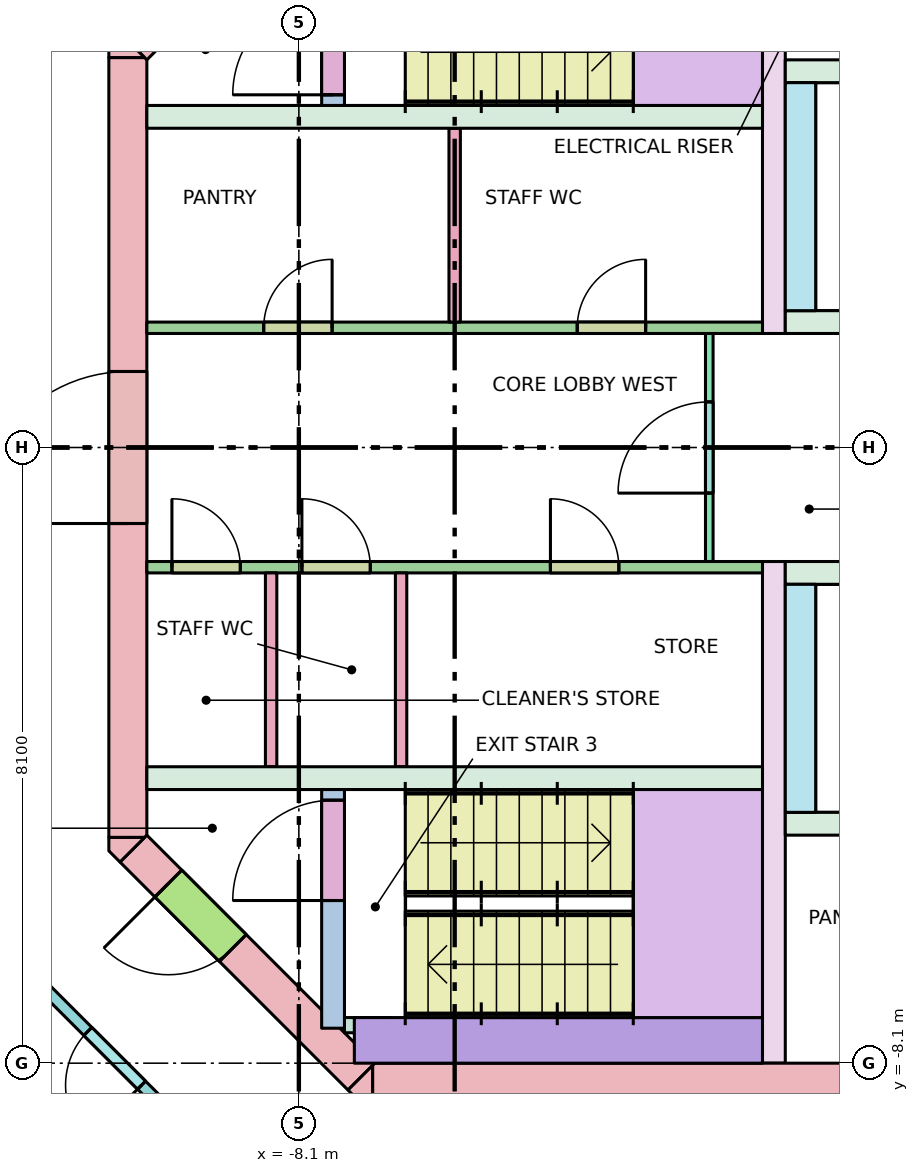
"""IFC4 building model, lengths in metres.
Left out: names, types, materials, properties, quantities, classifications, styles, units other than length and angle.
Written with IfcOpenShell. Run it as: python <this file> out.ifc"""

import sys

from ifc_helpers import new_model, si_unit, direction, frame, frame_2d, origin, place, context, subcontext, project, spatial, polyline, rectangle, outline, extrude, element, fill, save


model = new_model("IFC4")
c1 = context("Model", 3, precision=1e-05, world=origin(), true_north=direction((0.0, 1.0)))
c2 = subcontext(c1, "Body", "Model", "MODEL_VIEW")
j1 = project(units=[si_unit("LENGTHUNIT", "METRE"), si_unit("PLANEANGLEUNIT", "RADIAN")], contexts=[c1])
p1 = place(None, origin())
s1 = spatial("IfcSite", under=j1, at=p1, CompositionType="ELEMENT")
p2 = place(p1, origin())
s2 = spatial("IfcBuilding", under=s1, at=p2, CompositionType="ELEMENT")
p3 = place(p2, frame((0.0, 0.0, 283.4)))
s3 = spatial("IfcBuildingStorey", under=s2, at=p3, CompositionType="ELEMENT", Elevation=283.4)
p4 = place(p3, frame((-7.13, -8.35, -0.28), z_axis=(0.0, 0.0, 1.0), x_axis=(1.0, 0.0, 0.0)))
e1 = element("IfcWall", 1, at=p4, inside=s3, PredefinedType="SHEAR", context=c2, shape_type="SweptSolid", body=[
    extrude(rectangle(XDim=14.26, YDim=0.5, at=frame_2d((7.13, 0.0))), origin(), (0.0, 0.0, 1.0), 3.7),
])
p5 = place(p4, frame((8.08, 0.0, 0.28)))
e2 = element("IfcOpeningElement", 2, at=p5, cuts=e1, PredefinedType="OPENING", context=c2, shape_type="SweptSolid", body=[
    extrude(rectangle(XDim=0.7, YDim=2.1, at=frame_2d((0.35, 1.05))), frame((0.0, 0.26, 0.0), z_axis=(0.0, -1.0, 0.0), x_axis=(1.0, 0.0, 0.0)), (0.0, 0.0, 1.0), 0.52),
])
p6 = place(p4, frame((6.205, 0.0, 0.28)))
e3 = element("IfcOpeningElement", 3, at=p6, cuts=e1, PredefinedType="OPENING", context=c2, shape_type="SweptSolid", body=[
    extrude(rectangle(XDim=0.9, YDim=2.1, at=frame_2d((0.45, 1.05))), frame((0.0, 0.26, 0.0), z_axis=(0.0, -1.0, 0.0), x_axis=(1.0, 0.0, 0.0)), (0.0, 0.0, 1.0), 0.52),
])
p7 = place(p4, frame((10.667, 0.0, 0.28)))
e4 = element("IfcOpeningElement", 4, at=p7, cuts=e1, PredefinedType="OPENING", context=c2, shape_type="SweptSolid", body=[
    extrude(rectangle(XDim=0.9, YDim=2.1, at=frame_2d((0.45, 1.05))), frame((0.0, 0.26, 0.0), z_axis=(0.0, -1.0, 0.0), x_axis=(1.0, 0.0, 0.0)), (0.0, 0.0, 1.0), 0.52),
])
p8 = place(p3, frame((-10.35, -5.13, -0.28), z_axis=(0.0, 0.0, 1.0), x_axis=(0.0, 1.0, 0.0)))
e5 = element("IfcWall", 5, at=p8, inside=s3, PredefinedType="SHEAR", context=c2, shape_type="SweptSolid", body=[
    extrude(rectangle(XDim=10.26, YDim=0.5, at=frame_2d((5.13, 0.0))), origin(), (0.0, 0.0, 1.0), 3.7),
])
p9 = place(p8, frame((4.13, 0.0, 0.28)))
e6 = element("IfcOpeningElement", 6, at=p9, cuts=e5, PredefinedType="OPENING", context=c2, shape_type="SweptSolid", body=[
    extrude(rectangle(XDim=2.0, YDim=2.1, at=frame_2d((1.0, 1.05))), frame((0.0, 0.26, 0.0), z_axis=(0.0, -1.0, 0.0), x_axis=(1.0, 0.0, 0.0)), (0.0, 0.0, 1.0), 0.52),
])
p10 = place(p3, frame((-10.277, 5.277, -0.28), z_axis=(0.0, 0.0, 1.0), x_axis=(0.707106781187, 0.707106781187, 0.0)))
e7 = element("IfcWall", 7, at=p10, inside=s3, PredefinedType="SHEAR", context=c2, shape_type="SweptSolid", body=[
    extrude(rectangle(XDim=4.243, YDim=0.5, at=frame_2d((2.121, 0.0))), origin(), (0.0, 0.0, 1.0), 3.7),
])
p11 = place(p10, frame((0.65, 0.0, 0.28)))
e8 = element("IfcOpeningElement", 8, at=p11, cuts=e7, PredefinedType="OPENING", context=c2, shape_type="SweptSolid", body=[
    extrude(rectangle(XDim=1.2, YDim=2.1, at=frame_2d((0.6, 1.05))), frame((0.0, 0.26, 0.0), z_axis=(0.0, -1.0, 0.0), x_axis=(1.0, 0.0, 0.0)), (0.0, 0.0, 1.0), 0.52),
])
p12 = place(p3, frame((-7.277, -8.277, -0.28), z_axis=(0.0, 0.0, 1.0), x_axis=(-0.707106781187, 0.707106781187, 0.0)))
e9 = element("IfcWall", 9, at=p12, inside=s3, PredefinedType="SHEAR", context=c2, shape_type="SweptSolid", body=[
    extrude(rectangle(XDim=4.243, YDim=0.5, at=frame_2d((2.121, 0.0))), origin(), (0.0, 0.0, 1.0), 3.7),
])
p13 = place(p12, frame((2.393, 0.0, 0.28)))
e10 = element("IfcOpeningElement", 10, at=p13, cuts=e9, PredefinedType="OPENING", context=c2, shape_type="SweptSolid", body=[
    extrude(rectangle(XDim=1.2, YDim=2.1, at=frame_2d((0.6, 1.05))), frame((0.0, 0.26, 0.0), z_axis=(0.0, -1.0, 0.0), x_axis=(1.0, 0.0, 0.0)), (0.0, 0.0, 1.0), 0.52),
])
p14 = place(p3, frame((0.0, 0.0, -0.28)))
e11 = element("IfcWall", 11, at=p14, inside=s3, PredefinedType="SHEAR", context=c2, shape_type="SweptSolid", body=[
    extrude(outline(polyline([(-7.307, -8.6), (-7.454, -8.454), (-7.13, -8.13), (-7.13, -8.6), (-7.307, -8.6)])), origin(), (0.0, 0.0, 1.0), 3.7),
])
p15 = place(p3, frame((0.0, 0.0, -0.28)))
e12 = element("IfcWall", 12, at=p15, inside=s3, PredefinedType="SHEAR", context=c2, shape_type="SweptSolid", body=[
    extrude(outline(polyline([(-10.6, -5.307), (-10.6, -5.13), (-10.13, -5.13), (-10.454, -5.454), (-10.6, -5.307)])), origin(), (0.0, 0.0, 1.0), 3.7),
])
p16 = place(p3, frame((0.0, 0.0, -0.28)))
e13 = element("IfcWall", 13, at=p16, inside=s3, PredefinedType="SHEAR", context=c2, shape_type="SweptSolid", body=[
    extrude(outline(polyline([(-10.454, 5.454), (-10.13, 5.13), (-10.6, 5.13), (-10.6, 5.307), (-10.454, 5.454)])), origin(), (0.0, 0.0, 1.0), 3.7),
])
for number, where, z_axis, x_axis in (
    (14, (-10.1, 4.35, 0.0), (0.0, 0.0, 1.0), (1.0, 0.0, 0.0)),
    (15, (-10.1, -4.35, 0.0), (0.0, 0.0, 1.0), (1.0, 0.0, 0.0)),
):
    element("IfcWall", number, at=place(p3, frame(where, z_axis=z_axis, x_axis=x_axis)), inside=s3, PredefinedType="SOLIDWALL", context=c2, shape_type="SweptSolid", body=[
        extrude(rectangle(XDim=8.1, YDim=0.3, at=frame_2d((4.05, 0.0))), origin(), (0.0, 0.0, 1.0), 3.42),
    ])
for number, where, z_axis, x_axis in (
    (16, (-1.85, 1.5, 0.0), (0.0, 0.0, 1.0), (0.0, 1.0, 0.0)),
    (17, (-1.85, -8.1, 0.0), (0.0, 0.0, 1.0), (0.0, 1.0, 0.0)),
):
    element("IfcWall", number, at=place(p3, frame(where, z_axis=z_axis, x_axis=x_axis)), inside=s3, PredefinedType="SHEAR", context=c2, shape_type="SweptSolid", body=[
        extrude(rectangle(XDim=6.6, YDim=0.3, at=frame_2d((3.3, 0.0))), origin(), (0.0, 0.0, 1.0), 3.42),
    ])
p17 = place(p3, frame((-1.7, 1.65, 0.0), z_axis=(0.0, 0.0, 1.0), x_axis=(1.0, 0.0, 0.0)))
e18 = element("IfcWall", 18, at=p17, inside=s3, PredefinedType="SOLIDWALL", context=c2, shape_type="SweptSolid", body=[
    extrude(rectangle(XDim=3.4, YDim=0.3, at=frame_2d((1.7, 0.0))), origin(), (0.0, 0.0, 1.0), 3.42),
])
p18 = place(p17, frame((1.15, 0.0, 0.0)))
e19 = element("IfcOpeningElement", 19, at=p18, cuts=e18, PredefinedType="OPENING", context=c2, shape_type="SweptSolid", body=[
    extrude(rectangle(XDim=1.1, YDim=2.1, at=frame_2d((0.55, 1.05))), frame((0.0, 0.16, 0.0), z_axis=(0.0, -1.0, 0.0), x_axis=(1.0, 0.0, 0.0)), (0.0, 0.0, 1.0), 0.32),
])
p19 = place(p3, frame((-1.7, -1.65, 0.0), z_axis=(0.0, 0.0, 1.0), x_axis=(1.0, 0.0, 0.0)))
e20 = element("IfcWall", 20, at=p19, inside=s3, PredefinedType="SOLIDWALL", context=c2, shape_type="SweptSolid", body=[
    extrude(rectangle(XDim=3.4, YDim=0.3, at=frame_2d((1.7, 0.0))), origin(), (0.0, 0.0, 1.0), 3.42),
])
p20 = place(p19, frame((1.15, 0.0, 0.0)))
e21 = element("IfcOpeningElement", 21, at=p20, cuts=e20, PredefinedType="OPENING", context=c2, shape_type="SweptSolid", body=[
    extrude(rectangle(XDim=1.1, YDim=2.1, at=frame_2d((0.55, 1.05))), frame((0.0, 0.16, 0.0), z_axis=(0.0, -1.0, 0.0), x_axis=(1.0, 0.0, 0.0)), (0.0, 0.0, 1.0), 0.32),
])
for number, where, z_axis, x_axis in (
    (22, (-1.5, 1.8, 0.0), (0.0, 0.0, 1.0), (0.0, 1.0, 0.0)),
    (23, (-1.5, -4.8, 0.0), (0.0, 0.0, 1.0), (0.0, 1.0, 0.0)),
):
    element("IfcWall", number, at=place(p3, frame(where, z_axis=z_axis, x_axis=x_axis)), inside=s3, PredefinedType="SOLIDWALL", context=c2, shape_type="SweptSolid", body=[
        extrude(rectangle(XDim=3.0, YDim=0.4, at=frame_2d((1.5, 0.0))), origin(), (0.0, 0.0, 1.0), 3.42),
    ])
for number, where, z_axis, x_axis in (
    (24, (-1.7, 4.95, 0.0), (0.0, 0.0, 1.0), (1.0, 0.0, 0.0)),
    (25, (-1.7, -4.95, 0.0), (0.0, 0.0, 1.0), (1.0, 0.0, 0.0)),
):
    element("IfcWall", number, at=place(p3, frame(where, z_axis=z_axis, x_axis=x_axis)), inside=s3, PredefinedType="SOLIDWALL", context=c2, shape_type="SweptSolid", body=[
        extrude(rectangle(XDim=3.4, YDim=0.3, at=frame_2d((1.7, 0.0))), origin(), (0.0, 0.0, 1.0), 3.42),
    ])
p21 = place(p3, frame((-7.65, 4.5, 0.0), z_axis=(0.0, 0.0, 1.0), x_axis=(0.0, 1.0, 0.0)))
e26 = element("IfcWall", 26, at=p21, inside=s3, PredefinedType="SHEAR", context=c2, shape_type="SweptSolid", body=[
    extrude(rectangle(XDim=3.14, YDim=0.3, at=frame_2d((1.57, 0.0))), origin(), (0.0, 0.0, 1.0), 3.42),
])
p22 = place(p21, frame((0.14, 0.0, 0.0)))
e27 = element("IfcOpeningElement", 27, at=p22, cuts=e26, PredefinedType="OPENING", context=c2, shape_type="SweptSolid", body=[
    extrude(rectangle(XDim=1.32, YDim=2.1, at=frame_2d((0.66, 1.05))), frame((0.0, 0.16, 0.0), z_axis=(0.0, -1.0, 0.0), x_axis=(1.0, 0.0, 0.0)), (0.0, 0.0, 1.0), 0.32),
])
p23 = place(p3, frame((-7.65, -7.64, 0.0), z_axis=(0.0, 0.0, 1.0), x_axis=(0.0, 1.0, 0.0)))
e28 = element("IfcWall", 28, at=p23, inside=s3, PredefinedType="SHEAR", context=c2, shape_type="SweptSolid", body=[
    extrude(rectangle(XDim=3.14, YDim=0.3, at=frame_2d((1.57, 0.0))), origin(), (0.0, 0.0, 1.0), 3.42),
])
p24 = place(p23, frame((1.68, 0.0, 0.0)))
e29 = element("IfcOpeningElement", 29, at=p24, cuts=e28, PredefinedType="OPENING", context=c2, shape_type="SweptSolid", body=[
    extrude(rectangle(XDim=1.32, YDim=2.1, at=frame_2d((0.66, 1.05))), frame((0.0, 0.16, 0.0), z_axis=(0.0, -1.0, 0.0), x_axis=(1.0, 0.0, 0.0)), (0.0, 0.0, 1.0), 0.32),
])
p25 = place(p3, frame((-7.5, -7.6, 0.0), z_axis=(0.0, 0.0, 1.0), x_axis=(1.0, 0.0, 0.0)))
e30 = element("IfcWall", 30, at=p25, inside=s3, PredefinedType="SHEAR", context=c2, shape_type="SweptSolid", body=[
    extrude(rectangle(XDim=0.6, YDim=0.2, at=frame_2d((0.3, 0.0))), origin(), (0.0, 0.0, 1.0), 3.42),
])
p26 = place(p3, frame((-7.37, -7.8, 0.0), z_axis=(0.0, 0.0, 1.0), x_axis=(1.0, 0.0, 0.0)))
e31 = element("IfcWall", 31, at=p26, inside=s3, PredefinedType="SHEAR", context=c2, shape_type="SweptSolid", body=[
    extrude(rectangle(XDim=5.37, YDim=0.6, at=frame_2d((2.685, 0.0))), origin(), (0.0, 0.0, 1.0), 3.42),
])
p27 = place(p3, frame((-2.7, -1.5, 0.0), z_axis=(0.0, 0.0, 1.0), x_axis=(0.0, 1.0, 0.0)))
e32 = element("IfcWall", 32, at=p27, inside=s3, PredefinedType="PARTITIONING", context=c2, shape_type="SweptSolid", body=[
    extrude(rectangle(XDim=3.0, YDim=0.1, at=frame_2d((1.5, 0.0))), origin(), (0.0, 0.0, 1.0), 3.42),
])
p28 = place(p27, frame((0.9, 0.0, 0.0)))
e33 = element("IfcOpeningElement", 33, at=p28, cuts=e32, PredefinedType="OPENING", context=c2, shape_type="SweptSolid", body=[
    extrude(rectangle(XDim=1.2, YDim=2.1, at=frame_2d((0.6, 1.05))), frame((0.0, 0.06, 0.0), z_axis=(0.0, -1.0, 0.0), x_axis=(1.0, 0.0, 0.0)), (0.0, 0.0, 1.0), 0.12),
])
for number, where, z_axis, x_axis in (
    (34, (-6.05, 1.65, 0.0), (0.0, 0.0, 1.0), (0.0, 1.0, 0.0)),
    (35, (-8.465, -4.2, 0.0), (0.0, 0.0, 1.0), (0.0, 1.0, 0.0)),
    (36, (-6.755, -4.2, 0.0), (0.0, 0.0, 1.0), (0.0, 1.0, 0.0)),
):
    element("IfcWall", number, at=place(p3, frame(where, z_axis=z_axis, x_axis=x_axis)), inside=s3, PredefinedType="PARTITIONING", context=c2, shape_type="SweptSolid", body=[
        extrude(rectangle(XDim=2.55, YDim=0.15, at=frame_2d((1.275, 0.0))), origin(), (0.0, 0.0, 1.0), 3.42),
    ])
p29 = place(p3, frame((-10.1, 1.575, 0.0), z_axis=(0.0, 0.0, 1.0), x_axis=(1.0, 0.0, 0.0)))
e37 = element("IfcWall", 37, at=p29, inside=s3, PredefinedType="PARTITIONING", context=c2, shape_type="SweptSolid", body=[
    extrude(rectangle(XDim=8.1, YDim=0.15, at=frame_2d((4.05, 0.0))), origin(), (0.0, 0.0, 1.0), 3.42),
])
p30 = place(p29, frame((1.538, 0.0, 0.0)))
e38 = element("IfcOpeningElement", 38, at=p30, cuts=e37, PredefinedType="OPENING", context=c2, shape_type="SweptSolid", body=[
    extrude(rectangle(XDim=0.9, YDim=2.1, at=frame_2d((0.45, 1.05))), frame((0.0, 0.085, 0.0), z_axis=(0.0, -1.0, 0.0), x_axis=(1.0, 0.0, 0.0)), (0.0, 0.0, 1.0), 0.17),
])
p31 = place(p29, frame((5.663, 0.0, 0.0)))
e39 = element("IfcOpeningElement", 39, at=p31, cuts=e37, PredefinedType="OPENING", context=c2, shape_type="SweptSolid", body=[
    extrude(rectangle(XDim=0.9, YDim=2.1, at=frame_2d((0.45, 1.05))), frame((0.0, 0.085, 0.0), z_axis=(0.0, -1.0, 0.0), x_axis=(1.0, 0.0, 0.0)), (0.0, 0.0, 1.0), 0.17),
])
p32 = place(p3, frame((-10.1, -1.575, 0.0), z_axis=(0.0, 0.0, 1.0), x_axis=(1.0, 0.0, 0.0)))
e40 = element("IfcWall", 40, at=p32, inside=s3, PredefinedType="PARTITIONING", context=c2, shape_type="SweptSolid", body=[
    extrude(rectangle(XDim=8.1, YDim=0.15, at=frame_2d((4.05, 0.0))), origin(), (0.0, 0.0, 1.0), 3.42),
])
p33 = place(p32, frame((0.33, 0.0, 0.0)))
e41 = element("IfcOpeningElement", 41, at=p33, cuts=e40, PredefinedType="OPENING", context=c2, shape_type="SweptSolid", body=[
    extrude(rectangle(XDim=0.9, YDim=2.1, at=frame_2d((0.45, 1.05))), frame((0.0, 0.085, 0.0), z_axis=(0.0, -1.0, 0.0), x_axis=(1.0, 0.0, 0.0)), (0.0, 0.0, 1.0), 0.17),
])
p34 = place(p32, frame((2.04, 0.0, 0.0)))
e42 = element("IfcOpeningElement", 42, at=p34, cuts=e40, PredefinedType="OPENING", context=c2, shape_type="SweptSolid", body=[
    extrude(rectangle(XDim=0.9, YDim=2.1, at=frame_2d((0.45, 1.05))), frame((0.0, 0.085, 0.0), z_axis=(0.0, -1.0, 0.0), x_axis=(1.0, 0.0, 0.0)), (0.0, 0.0, 1.0), 0.17),
])
p35 = place(p32, frame((5.31, 0.0, 0.0)))
e43 = element("IfcOpeningElement", 43, at=p35, cuts=e40, PredefinedType="OPENING", context=c2, shape_type="SweptSolid", body=[
    extrude(rectangle(XDim=0.9, YDim=2.1, at=frame_2d((0.45, 1.05))), frame((0.0, 0.085, 0.0), z_axis=(0.0, -1.0, 0.0), x_axis=(1.0, 0.0, 0.0)), (0.0, 0.0, 1.0), 0.17),
])
p36 = place(p3, frame((-8.121, -10.438, 0.0), z_axis=(0.0, 0.0, 1.0), x_axis=(-0.707106781187, 0.707106781187, 0.0)))
e44 = element("IfcWall", 44, at=p36, inside=s3, PredefinedType="PARTITIONING", context=c2, shape_type="SweptSolid", body=[
    extrude(rectangle(XDim=6.105, YDim=0.15, at=frame_2d((3.053, 0.0))), origin(), (0.0, 0.0, 1.0), 2.57),
])
p37 = place(p36, frame((2.897, 0.0, 0.0)))
e45 = element("IfcOpeningElement", 45, at=p37, cuts=e44, PredefinedType="OPENING", context=c2, shape_type="SweptSolid", body=[
    extrude(rectangle(XDim=1.0, YDim=2.1, at=frame_2d((0.5, 1.05))), frame((0.0, 0.085, 0.0), z_axis=(0.0, -1.0, 0.0), x_axis=(1.0, 0.0, 0.0)), (0.0, 0.0, 1.0), 0.17),
])
p38 = place(p36, frame((0.394, 0.0, 0.0)))
e46 = element("IfcOpeningElement", 46, at=p38, cuts=e44, PredefinedType="OPENING", context=c2, shape_type="SweptSolid", body=[
    extrude(rectangle(XDim=0.9, YDim=2.1, at=frame_2d((0.45, 1.05))), frame((0.0, 0.085, 0.0), z_axis=(0.0, -1.0, 0.0), x_axis=(1.0, 0.0, 0.0)), (0.0, 0.0, 1.0), 0.17),
])
p39 = place(p22, origin())
e47 = element("IfcDoor", 47, at=p39, inside=s3, OperationType="DOUBLE_DOOR_SINGLE_SWING", PredefinedType="DOOR", context=c2, shape_type="SweptSolid", body=[
    extrude(rectangle(XDim=1.32, YDim=2.1, at=frame_2d((0.66, 1.05))), frame((0.0, 0.025, 0.0), z_axis=(0.0, -1.0, 0.0), x_axis=(1.0, 0.0, 0.0)), (0.0, 0.0, 1.0), 0.05),
])
fill(e27, e47)
p40 = place(p24, origin())
e48 = element("IfcDoor", 48, at=p40, inside=s3, OperationType="DOUBLE_DOOR_SINGLE_SWING", PredefinedType="DOOR", context=c2, shape_type="SweptSolid", body=[
    extrude(rectangle(XDim=1.32, YDim=2.1, at=frame_2d((0.66, 1.05))), frame((0.0, 0.025, 0.0), z_axis=(0.0, -1.0, 0.0), x_axis=(1.0, 0.0, 0.0)), (0.0, 0.0, 1.0), 0.05),
])
fill(e29, e48)
p41 = place(p13, origin())
e49 = element("IfcDoor", 49, at=p41, inside=s3, OperationType="SINGLE_SWING_RIGHT", PredefinedType="DOOR", context=c2, shape_type="SweptSolid", body=[
    extrude(rectangle(XDim=1.2, YDim=2.1, at=frame_2d((0.6, 1.05))), frame((0.0, 0.025, 0.0), z_axis=(0.0, -1.0, 0.0), x_axis=(1.0, 0.0, 0.0)), (0.0, 0.0, 1.0), 0.05),
])
fill(e10, e49)
p42 = place(p9, origin())
e50 = element("IfcDoor", 50, at=p42, inside=s3, OperationType="DOUBLE_DOOR_SINGLE_SWING", PredefinedType="DOOR", context=c2, shape_type="SweptSolid", body=[
    extrude(rectangle(XDim=2.0, YDim=2.1, at=frame_2d((1.0, 1.05))), frame((0.0, 0.025, 0.0), z_axis=(0.0, -1.0, 0.0), x_axis=(1.0, 0.0, 0.0)), (0.0, 0.0, 1.0), 0.05),
])
fill(e6, e50)
p43 = place(p28, origin())
e51 = element("IfcDoor", 51, at=p43, inside=s3, OperationType="SINGLE_SWING_LEFT", PredefinedType="DOOR", context=c2, shape_type="SweptSolid", body=[
    extrude(rectangle(XDim=1.2, YDim=2.1, at=frame_2d((0.6, 1.05))), frame((0.0, 0.025, 0.0), z_axis=(0.0, -1.0, 0.0), x_axis=(1.0, 0.0, 0.0)), (0.0, 0.0, 1.0), 0.05),
])
fill(e33, e51)
p44 = place(p30, origin())
e52 = element("IfcDoor", 52, at=p44, inside=s3, OperationType="SINGLE_SWING_RIGHT", PredefinedType="DOOR", context=c2, shape_type="SweptSolid", body=[
    extrude(rectangle(XDim=0.9, YDim=2.1, at=frame_2d((0.45, 1.05))), frame((0.0, 0.025, 0.0), z_axis=(0.0, -1.0, 0.0), x_axis=(1.0, 0.0, 0.0)), (0.0, 0.0, 1.0), 0.05),
])
fill(e38, e52)
p45 = place(p31, origin())
e53 = element("IfcDoor", 53, at=p45, inside=s3, OperationType="SINGLE_SWING_RIGHT", PredefinedType="DOOR", context=c2, shape_type="SweptSolid", body=[
    extrude(rectangle(XDim=0.9, YDim=2.1, at=frame_2d((0.45, 1.05))), frame((0.0, 0.025, 0.0), z_axis=(0.0, -1.0, 0.0), x_axis=(1.0, 0.0, 0.0)), (0.0, 0.0, 1.0), 0.05),
])
fill(e39, e53)
p46 = place(p33, origin())
e54 = element("IfcDoor", 54, at=p46, inside=s3, OperationType="SINGLE_SWING_LEFT", PredefinedType="DOOR", context=c2, shape_type="SweptSolid", body=[
    extrude(rectangle(XDim=0.9, YDim=2.1, at=frame_2d((0.45, 1.05))), frame((0.0, 0.025, 0.0), z_axis=(0.0, -1.0, 0.0), x_axis=(1.0, 0.0, 0.0)), (0.0, 0.0, 1.0), 0.05),
])
fill(e41, e54)
p47 = place(p34, origin())
e55 = element("IfcDoor", 55, at=p47, inside=s3, OperationType="SINGLE_SWING_LEFT", PredefinedType="DOOR", context=c2, shape_type="SweptSolid", body=[
    extrude(rectangle(XDim=0.9, YDim=2.1, at=frame_2d((0.45, 1.05))), frame((0.0, 0.025, 0.0), z_axis=(0.0, -1.0, 0.0), x_axis=(1.0, 0.0, 0.0)), (0.0, 0.0, 1.0), 0.05),
])
fill(e42, e55)
p48 = place(p35, origin())
e56 = element("IfcDoor", 56, at=p48, inside=s3, OperationType="SINGLE_SWING_LEFT", PredefinedType="DOOR", context=c2, shape_type="SweptSolid", body=[
    extrude(rectangle(XDim=0.9, YDim=2.1, at=frame_2d((0.45, 1.05))), frame((0.0, 0.025, 0.0), z_axis=(0.0, -1.0, 0.0), x_axis=(1.0, 0.0, 0.0)), (0.0, 0.0, 1.0), 0.05),
])
fill(e43, e56)
p49 = place(p37, origin())
e57 = element("IfcDoor", 57, at=p49, inside=s3, OperationType="SINGLE_SWING_LEFT", PredefinedType="DOOR", context=c2, shape_type="SweptSolid", body=[
    extrude(rectangle(XDim=1.0, YDim=2.1, at=frame_2d((0.5, 1.05))), frame((0.0, 0.025, 0.0), z_axis=(0.0, -1.0, 0.0), x_axis=(1.0, 0.0, 0.0)), (0.0, 0.0, 1.0), 0.05),
])
fill(e45, e57)
save(model, sys.argv[1])
